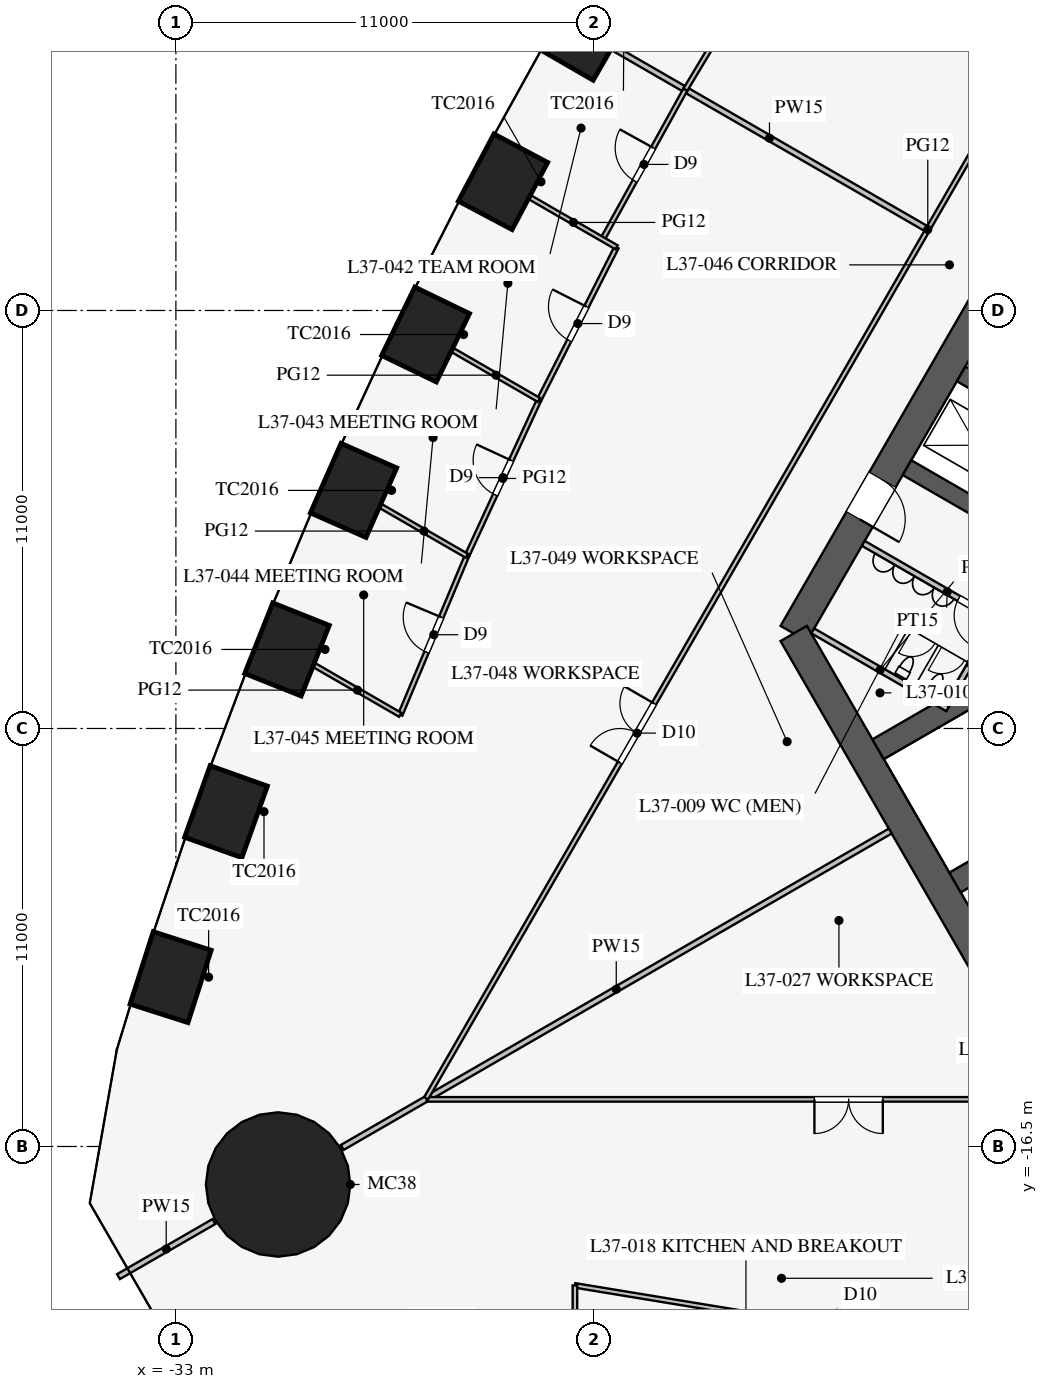
"""IFC4 building model, lengths in metres.
Left out: names, types, materials, properties, quantities, classifications, styles, units other than length and angle.
Written with IfcOpenShell. Run it as: python <this file> out.ifc"""

import sys

from ifc_helpers import new_model, si_unit, direction, frame, frame_2d, origin, origin_2d, place, context, subcontext, project, spatial, rectangle, circle, extrude, element, fill, save


model = new_model("IFC4")
c1 = context("Model", 3, precision=1e-05, world=origin(), true_north=direction((0.0, 1.0)))
c2 = subcontext(c1, "Body", "Model", "MODEL_VIEW")
j1 = project(units=[si_unit("LENGTHUNIT", "METRE"), si_unit("PLANEANGLEUNIT", "RADIAN")], contexts=[c1])
p1 = place(None, origin())
s1 = spatial("IfcSite", under=j1, at=p1, CompositionType="ELEMENT")
p2 = place(p1, origin())
s2 = spatial("IfcBuilding", under=s1, at=p2, CompositionType="ELEMENT")
p3 = place(p2, frame((0.0, 0.0, 161.9)))
s3 = spatial("IfcBuildingStorey", under=s2, at=p3, CompositionType="ELEMENT", Elevation=161.9)
for number, where, z_axis, x_axis in (
    (1, (-22.213, 12.825, 0.0), (0.0, 0.0, 1.0), (-0.5, -0.866, 0.0)),
    (2, (-24.393, 8.887, 0.0), (0.0, 0.0, 1.0), (-0.468, -0.883, 0.0)),
    (3, (-26.43, 4.867, 0.0), (0.0, 0.0, 1.0), (-0.436, -0.9, 0.0)),
    (4, (-28.325, 0.765, 0.0), (0.0, 0.0, 1.0), (-0.403, -0.915, 0.0)),
    (5, (-30.077, -3.42, 0.0), (0.0, 0.0, 1.0), (-0.37, -0.929, 0.0)),
    (6, (-31.682, -7.689, 0.0), (0.0, 0.0, 1.0), (-0.336, -0.942, 0.0)),
    (7, (-33.139, -12.044, 0.0), (0.0, 0.0, 1.0), (-0.305, -0.952, 0.0)),
):
    element("IfcColumn", number, at=place(p3, frame(where, z_axis=z_axis, x_axis=x_axis)), inside=s3, PredefinedType="COLUMN", context=c2, shape_type="SweptSolid", body=[
        extrude(rectangle(XDim=2.0, YDim=1.6, at=origin_2d()), origin(), (0.0, 0.0, 1.0), 4.2),
    ])
p4 = place(p3, frame((-30.311, -17.5, 0.0), z_axis=(0.0, 0.0, 1.0), x_axis=(1.0, 0.0, 0.0)))
e8 = element("IfcColumn", 8, at=p4, inside=s3, PredefinedType="COLUMN", context=c2, shape_type="SweptSolid", body=[
    extrude(circle(Radius=1.9, at=origin_2d()), origin(), (0.0, 0.0, 1.0), 4.2),
])
p5 = place(p3, frame((-5.773, 16.0, 0.0), z_axis=(0.0, 0.0, 1.0), x_axis=(-0.500002442456, -0.866023993627, 0.0)))
e9 = element("IfcWall", 9, at=p5, inside=s3, PredefinedType="SHEAR", context=c2, shape_type="SweptSolid", body=[
    extrude(rectangle(XDim=21.939, YDim=0.8, at=frame_2d((10.97, 0.0))), origin(), (0.0, 0.0, 1.0), 4.2),
])
p6 = place(p5, frame((17.27, 0.0, 0.0)))
e10 = element("IfcOpeningElement", 10, at=p6, cuts=e9, PredefinedType="OPENING", context=c2, shape_type="SweptSolid", body=[
    extrude(rectangle(XDim=1.2, YDim=2.1, at=frame_2d((0.6, 1.05))), frame((0.0, 0.41, 0.0), z_axis=(0.0, -1.0, 0.0), x_axis=(1.0, 0.0, 0.0)), (0.0, 0.0, 1.0), 0.82),
])
p7 = place(p5, frame((3.47, 0.0, 0.0)))
e11 = element("IfcOpeningElement", 11, at=p7, cuts=e9, PredefinedType="OPENING", context=c2, shape_type="SweptSolid", body=[
    extrude(rectangle(XDim=1.2, YDim=2.1, at=frame_2d((0.6, 1.05))), frame((0.0, 0.41, 0.0), z_axis=(0.0, -1.0, 0.0), x_axis=(1.0, 0.0, 0.0)), (0.0, 0.0, 1.0), 0.82),
])
p8 = place(p3, frame((-16.743, -3.0, 0.0), z_axis=(0.0, 0.0, 1.0), x_axis=(0.499995765644, -0.866027848477, 0.0)))
e12 = element("IfcWall", 12, at=p8, inside=s3, PredefinedType="SHEAR", context=c2, shape_type="SweptSolid", body=[
    extrude(rectangle(XDim=11.547, YDim=0.8, at=frame_2d((5.773, 0.0))), origin(), (0.0, 0.0, 1.0), 4.2),
])
for number, where, z_axis, x_axis in (
    (13, (-10.107, 2.544, 0.0), (0.0, 0.0, 1.0), (-0.866, 0.5, 0.0)),
    (14, (-11.532, 0.076, 0.0), (0.0, 0.0, 1.0), (-0.866, 0.5, 0.0)),
):
    element("IfcWall", number, at=place(p3, frame(where, z_axis=z_axis, x_axis=x_axis)), inside=s3, PredefinedType="SHEAR", context=c2, shape_type="SweptSolid", body=[
        extrude(rectangle(XDim=2.575, YDim=0.45, at=frame_2d((1.288, 0.0))), origin(), (0.0, 0.0, 1.0), 4.2),
    ])
for number, where, z_axis, x_axis in (
    (15, (-6.663, -1.509, 0.0), (0.0, 0.0, 1.0), (-0.866, -0.5, 0.0)),
    (16, (-4.638, -5.016, 0.0), (0.0, 0.0, 1.0), (-0.866, -0.5, 0.0)),
):
    element("IfcWall", number, at=place(p3, frame(where, z_axis=z_axis, x_axis=x_axis)), inside=s3, PredefinedType="SHEAR", context=c2, shape_type="SweptSolid", body=[
        extrude(rectangle(XDim=9.075, YDim=0.6, at=frame_2d((4.538, 0.0))), origin(), (0.0, 0.0, 1.0), 4.2),
    ])
p9 = place(p3, frame((-10.495, -3.178, 0.0), z_axis=(0.0, 0.0, 1.0), x_axis=(-0.86602216432, 0.500005610874, 0.0)))
e17 = element("IfcWall", 17, at=p9, inside=s3, PredefinedType="PARTITIONING", context=c2, shape_type="SweptSolid", body=[
    extrude(rectangle(XDim=5.1, YDim=0.15, at=frame_2d((2.55, 0.0))), origin(), (0.0, 0.0, 1.0), 4.0),
])
p10 = place(p9, frame((1.3, 0.0, 0.0)))
e18 = element("IfcOpeningElement", 18, at=p10, cuts=e17, PredefinedType="OPENING", context=c2, shape_type="SweptSolid", body=[
    extrude(rectangle(XDim=0.9, YDim=2.1, at=frame_2d((0.45, 1.05))), frame((0.0, 0.085, 0.0), z_axis=(0.0, -1.0, 0.0), x_axis=(1.0, 0.0, 0.0)), (0.0, 0.0, 1.0), 0.17),
])
p11 = place(p3, frame((-12.691, -4.982, 0.0), z_axis=(0.0, 0.0, 1.0), x_axis=(-0.8660249478, 0.500000789788, 0.0)))
e19 = element("IfcWall", 19, at=p11, inside=s3, PredefinedType="PARTITIONING", context=c2, shape_type="SweptSolid", body=[
    extrude(rectangle(XDim=4.1, YDim=0.15, at=frame_2d((2.05, 0.0))), origin(), (0.0, 0.0, 1.0), 4.0),
])
p12 = place(p3, frame((-11.464, -2.706, 0.0), z_axis=(0.0, 0.0, 1.0), x_axis=(-0.50001992892, -0.866013897511, 0.0)))
e20 = element("IfcWall", 20, at=p12, inside=s3, PredefinedType="PARTITIONING", context=c2, shape_type="SweptSolid", body=[
    extrude(rectangle(XDim=2.51, YDim=0.15, at=frame_2d((1.255, 0.0))), origin(), (0.0, 0.0, 1.0), 4.0),
])
p13 = place(p3, frame((-14.203, -8.2, 0.0), z_axis=(0.0, 0.0, 1.0), x_axis=(-0.866024668836, -0.500001272966, 0.0)))
e21 = element("IfcWall", 21, at=p13, inside=s3, PredefinedType="PARTITIONING", context=c2, shape_type="SweptSolid", body=[
    extrude(rectangle(XDim=16.65, YDim=0.15, at=frame_2d((8.325, 0.0))), origin(), (0.0, 0.0, 1.0), 2.3),
])
p14 = place(p3, frame((-32.0, -18.475, 0.0), z_axis=(0.0, 0.0, 1.0), x_axis=(-0.866042548026, -0.499970304126, 0.0)))
e22 = element("IfcWall", 22, at=p14, inside=s3, PredefinedType="PARTITIONING", context=c2, shape_type="SweptSolid", body=[
    extrude(rectangle(XDim=2.899, YDim=0.15, at=frame_2d((1.45, 0.0))), origin(), (0.0, 0.0, 1.0), 2.3),
])
p15 = place(p3, frame((-26.398, -15.26, 0.0), z_axis=(0.0, 0.0, 1.0), x_axis=(1.0, 0.0, 0.0)))
e23 = element("IfcWall", 23, at=p15, inside=s3, PredefinedType="PARTITIONING", context=c2, shape_type="SweptSolid", body=[
    extrude(rectangle(XDim=52.796, YDim=0.12, at=frame_2d((26.398, 0.0))), origin(), (0.0, 0.0, 1.0), 2.9),
])
p16 = place(p15, frame((10.2, 0.0, 0.15)))
e24 = element("IfcOpeningElement", 24, at=p16, cuts=e23, PredefinedType="OPENING", context=c2, shape_type="SweptSolid", body=[
    extrude(rectangle(XDim=1.8, YDim=2.1, at=frame_2d((0.9, 1.05))), frame((0.0, 0.07, 0.0), z_axis=(0.0, -1.0, 0.0), x_axis=(1.0, 0.0, 0.0)), (0.0, 0.0, 1.0), 0.14),
])
p17 = place(p15, frame((40.8, 0.0, 0.15)))
e25 = element("IfcOpeningElement", 25, at=p17, cuts=e23, PredefinedType="OPENING", context=c2, shape_type="SweptSolid", body=[
    extrude(rectangle(XDim=1.8, YDim=2.1, at=frame_2d((0.9, 1.05))), frame((0.0, 0.07, 0.0), z_axis=(0.0, -1.0, 0.0), x_axis=(1.0, 0.0, 0.0)), (0.0, 0.0, 1.0), 0.14),
])
p18 = place(p3, frame((-22.5, -20.156, 0.0), z_axis=(0.0, 0.0, 1.0), x_axis=(0.986764681833, -0.162158757664, 0.0)))
e26 = element("IfcWall", 26, at=p18, inside=s3, PredefinedType="PARTITIONING", context=c2, shape_type="SweptSolid", body=[
    extrude(rectangle(XDim=4.56, YDim=0.12, at=frame_2d((2.28, 0.0))), origin(), (0.0, 0.0, 1.0), 2.9),
])
p19 = place(p3, frame((-22.5, -20.156, 0.0), z_axis=(0.0, 0.0, 1.0), x_axis=(0.0, -1.0, 0.0)))
e27 = element("IfcWall", 27, at=p19, inside=s3, PredefinedType="PARTITIONING", context=c2, shape_type="SweptSolid", body=[
    extrude(rectangle(XDim=2.593, YDim=0.12, at=frame_2d((1.296, 0.0))), origin(), (0.0, 0.0, 1.0), 2.9),
])
p20 = place(p3, frame((-13.268, 7.66, 0.0), z_axis=(0.0, 0.0, 1.0), x_axis=(-0.866013963754, 0.500019814191, 0.0)))
e28 = element("IfcWall", 28, at=p20, inside=s3, PredefinedType="PARTITIONING", context=c2, shape_type="SweptSolid", body=[
    extrude(rectangle(XDim=9.5, YDim=0.15, at=frame_2d((4.75, 0.0))), origin(), (0.0, 0.0, 1.0), 2.8),
])
p21 = place(p3, frame((-0.016, 30.491, 0.0), z_axis=(0.0, 0.0, 1.0), x_axis=(-0.50000091641, -0.866024874695, 0.0)))
e29 = element("IfcWall", 29, at=p21, inside=s3, PredefinedType="PARTITIONING", context=c2, shape_type="SweptSolid", body=[
    extrude(rectangle(XDim=52.796, YDim=0.12, at=frame_2d((26.398, 0.0))), origin(), (0.0, 0.0, 1.0), 2.9),
])
p22 = place(p21, frame((10.2, 0.0, 0.15)))
e30 = element("IfcOpeningElement", 30, at=p22, cuts=e29, PredefinedType="OPENING", context=c2, shape_type="SweptSolid", body=[
    extrude(rectangle(XDim=1.8, YDim=2.1, at=frame_2d((0.9, 1.05))), frame((0.0, 0.07, 0.0), z_axis=(0.0, -1.0, 0.0), x_axis=(1.0, 0.0, 0.0)), (0.0, 0.0, 1.0), 0.14),
])
p23 = place(p21, frame((40.8, 0.0, 0.15)))
e31 = element("IfcOpeningElement", 31, at=p23, cuts=e29, PredefinedType="OPENING", context=c2, shape_type="SweptSolid", body=[
    extrude(rectangle(XDim=1.8, YDim=2.1, at=frame_2d((0.9, 1.05))), frame((0.0, 0.07, 0.0), z_axis=(0.0, -1.0, 0.0), x_axis=(1.0, 0.0, 0.0)), (0.0, 0.0, 1.0), 0.14),
])
p24 = place(p3, frame((-19.594, 11.312, 0.0), z_axis=(0.0, 0.0, 1.0), x_axis=(-0.484315883017, -0.87489320803, 0.0)))
e32 = element("IfcWall", 32, at=p24, inside=s3, PredefinedType="PARTITIONING", context=c2, shape_type="SweptSolid", body=[
    extrude(rectangle(XDim=4.5, YDim=0.12, at=frame_2d((2.25, 0.0))), origin(), (0.0, 0.0, 1.0), 2.9),
])
p25 = place(p24, frame((1.75, 0.0, 0.15)))
e33 = element("IfcOpeningElement", 33, at=p25, cuts=e32, PredefinedType="OPENING", context=c2, shape_type="SweptSolid", body=[
    extrude(rectangle(XDim=1.0, YDim=2.1, at=frame_2d((0.5, 1.05))), frame((0.0, 0.07, 0.0), z_axis=(0.0, -1.0, 0.0), x_axis=(1.0, 0.0, 0.0)), (0.0, 0.0, 1.0), 0.14),
])
p26 = place(p3, frame((-25.342, -0.958, 0.0), z_axis=(0.0, 0.0, 1.0), x_axis=(-0.386807881778, -0.922160323693, 0.0)))
e34 = element("IfcWall", 34, at=p26, inside=s3, PredefinedType="PARTITIONING", context=c2, shape_type="SweptSolid", body=[
    extrude(rectangle(XDim=4.536, YDim=0.12, at=frame_2d((2.268, 0.0))), origin(), (0.0, 0.0, 1.0), 2.9),
])
p27 = place(p26, frame((1.75, 0.0, 0.15)))
e35 = element("IfcOpeningElement", 35, at=p27, cuts=e34, PredefinedType="OPENING", context=c2, shape_type="SweptSolid", body=[
    extrude(rectangle(XDim=1.0, YDim=2.1, at=frame_2d((0.5, 1.05))), frame((0.0, 0.07, 0.0), z_axis=(0.0, -1.0, 0.0), x_axis=(1.0, 0.0, 0.0)), (0.0, 0.0, 1.0), 0.14),
])
p28 = place(p3, frame((-21.405, 7.162, 0.0), z_axis=(0.0, 0.0, 1.0), x_axis=(-0.452471679136, -0.891778772779, 0.0)))
e36 = element("IfcWall", 36, at=p28, inside=s3, PredefinedType="PARTITIONING", context=c2, shape_type="SweptSolid", body=[
    extrude(rectangle(XDim=4.507, YDim=0.12, at=frame_2d((2.253, 0.0))), origin(), (0.0, 0.0, 1.0), 2.9),
])
p29 = place(p28, frame((1.75, 0.0, 0.15)))
e37 = element("IfcOpeningElement", 37, at=p29, cuts=e36, PredefinedType="OPENING", context=c2, shape_type="SweptSolid", body=[
    extrude(rectangle(XDim=1.0, YDim=2.1, at=frame_2d((0.5, 1.05))), frame((0.0, 0.07, 0.0), z_axis=(0.0, -1.0, 0.0), x_axis=(1.0, 0.0, 0.0)), (0.0, 0.0, 1.0), 0.14),
])
p30 = place(p3, frame((-23.444, 3.143, 0.0), z_axis=(0.0, 0.0, 1.0), x_axis=(-0.419883773418, -0.907577884713, 0.0)))
e38 = element("IfcWall", 38, at=p30, inside=s3, PredefinedType="PARTITIONING", context=c2, shape_type="SweptSolid", body=[
    extrude(rectangle(XDim=4.519, YDim=0.12, at=frame_2d((2.259, 0.0))), origin(), (0.0, 0.0, 1.0), 2.9),
])
p31 = place(p30, frame((1.75, 0.0, 0.15)))
e39 = element("IfcOpeningElement", 39, at=p31, cuts=e38, PredefinedType="OPENING", context=c2, shape_type="SweptSolid", body=[
    extrude(rectangle(XDim=1.0, YDim=2.1, at=frame_2d((0.5, 1.05))), frame((0.0, 0.07, 0.0), z_axis=(0.0, -1.0, 0.0), x_axis=(1.0, 0.0, 0.0)), (0.0, 0.0, 1.0), 0.14),
])
p32 = place(p3, frame((-17.273, 15.169, 0.0), z_axis=(0.0, 0.0, 1.0), x_axis=(-0.515524404457, -0.856874896592, 0.0)))
e40 = element("IfcWall", 40, at=p32, inside=s3, PredefinedType="PARTITIONING", context=c2, shape_type="SweptSolid", body=[
    extrude(rectangle(XDim=4.501, YDim=0.12, at=frame_2d((2.25, 0.0))), origin(), (0.0, 0.0, 1.0), 2.9),
])
p33 = place(p32, frame((1.75, 0.0, 0.15)))
e41 = element("IfcOpeningElement", 41, at=p33, cuts=e40, PredefinedType="OPENING", context=c2, shape_type="SweptSolid", body=[
    extrude(rectangle(XDim=1.0, YDim=2.1, at=frame_2d((0.5, 1.05))), frame((0.0, 0.07, 0.0), z_axis=(0.0, -1.0, 0.0), x_axis=(1.0, 0.0, 0.0)), (0.0, 0.0, 1.0), 0.14),
])
p34 = place(p3, frame((-25.342, -0.958, 0.0), z_axis=(0.0, 0.0, 1.0), x_axis=(-0.866036074319, 0.499981517636, 0.0)))
e42 = element("IfcWall", 42, at=p34, inside=s3, PredefinedType="PARTITIONING", context=c2, shape_type="SweptSolid", body=[
    extrude(rectangle(XDim=2.61, YDim=0.12, at=frame_2d((1.305, 0.0))), origin(), (0.0, 0.0, 1.0), 2.6),
])
p35 = place(p3, frame((-27.096, -5.141, 0.0), z_axis=(0.0, 0.0, 1.0), x_axis=(-0.866012205188, 0.500022859943, 0.0)))
e43 = element("IfcWall", 43, at=p35, inside=s3, PredefinedType="PARTITIONING", context=c2, shape_type="SweptSolid", body=[
    extrude(rectangle(XDim=2.603, YDim=0.12, at=frame_2d((1.302, 0.0))), origin(), (0.0, 0.0, 1.0), 2.8),
])
p36 = place(p3, frame((-21.405, 7.162, 0.0), z_axis=(0.0, 0.0, 1.0), x_axis=(-0.866008611403, 0.50002908413, 0.0)))
e44 = element("IfcWall", 44, at=p36, inside=s3, PredefinedType="PARTITIONING", context=c2, shape_type="SweptSolid", body=[
    extrude(rectangle(XDim=2.619, YDim=0.12, at=frame_2d((1.31, 0.0))), origin(), (0.0, 0.0, 1.0), 2.8),
])
p37 = place(p3, frame((-23.444, 3.143, 0.0), z_axis=(0.0, 0.0, 1.0), x_axis=(-0.866011491631, 0.500024095782, 0.0)))
e45 = element("IfcWall", 45, at=p37, inside=s3, PredefinedType="PARTITIONING", context=c2, shape_type="SweptSolid", body=[
    extrude(rectangle(XDim=2.615, YDim=0.12, at=frame_2d((1.308, 0.0))), origin(), (0.0, 0.0, 1.0), 2.9),
])
p38 = place(p10, origin())
e46 = element("IfcDoor", 46, at=p38, inside=s3, OperationType="SINGLE_SWING_LEFT", PredefinedType="DOOR", context=c2, shape_type="SweptSolid", body=[
    extrude(rectangle(XDim=0.9, YDim=2.1, at=frame_2d((0.45, 1.05))), frame((0.0, 0.025, 0.0), z_axis=(0.0, -1.0, 0.0), x_axis=(1.0, 0.0, 0.0)), (0.0, 0.0, 1.0), 0.05),
])
fill(e18, e46)
p39 = place(p6, origin())
e47 = element("IfcDoor", 47, at=p39, inside=s3, OperationType="SINGLE_SWING_RIGHT", PredefinedType="DOOR", context=c2, shape_type="SweptSolid", body=[
    extrude(rectangle(XDim=1.2, YDim=2.1, at=frame_2d((0.6, 1.05))), frame((0.0, 0.025, 0.0), z_axis=(0.0, -1.0, 0.0), x_axis=(1.0, 0.0, 0.0)), (0.0, 0.0, 1.0), 0.05),
])
fill(e10, e47)
p40 = place(p16, frame((1.8, 0.0, 0.0), z_axis=(0.0, 0.0, 1.0), x_axis=(-1.0, 0.0, 0.0)))
e48 = element("IfcDoor", 48, at=p40, inside=s3, OperationType="DOUBLE_DOOR_SINGLE_SWING", PredefinedType="DOOR", context=c2, shape_type="SweptSolid", body=[
    extrude(rectangle(XDim=1.8, YDim=2.1, at=frame_2d((0.9, 1.05))), frame((0.0, 0.025, 0.0), z_axis=(0.0, -1.0, 0.0), x_axis=(1.0, 0.0, 0.0)), (0.0, 0.0, 1.0), 0.05),
])
fill(e24, e48)
p41 = place(p25, frame((1.0, 0.0, 0.0), z_axis=(0.0, 0.0, 1.0), x_axis=(-1.0, 0.0, 0.0)))
e49 = element("IfcDoor", 49, at=p41, inside=s3, OperationType="SINGLE_SWING_RIGHT", PredefinedType="DOOR", context=c2, shape_type="SweptSolid", body=[
    extrude(rectangle(XDim=1.0, YDim=2.1, at=frame_2d((0.5, 1.05))), frame((0.0, 0.025, 0.0), z_axis=(0.0, -1.0, 0.0), x_axis=(1.0, 0.0, 0.0)), (0.0, 0.0, 1.0), 0.05),
])
fill(e33, e49)
p42 = place(p29, frame((1.0, 0.0, 0.0), z_axis=(0.0, 0.0, 1.0), x_axis=(-1.0, 0.0, 0.0)))
e50 = element("IfcDoor", 50, at=p42, inside=s3, OperationType="SINGLE_SWING_RIGHT", PredefinedType="DOOR", context=c2, shape_type="SweptSolid", body=[
    extrude(rectangle(XDim=1.0, YDim=2.1, at=frame_2d((0.5, 1.05))), frame((0.0, 0.025, 0.0), z_axis=(0.0, -1.0, 0.0), x_axis=(1.0, 0.0, 0.0)), (0.0, 0.0, 1.0), 0.05),
])
fill(e37, e50)
p43 = place(p31, frame((1.0, 0.0, 0.0), z_axis=(0.0, 0.0, 1.0), x_axis=(-1.0, 0.0, 0.0)))
e51 = element("IfcDoor", 51, at=p43, inside=s3, OperationType="SINGLE_SWING_RIGHT", PredefinedType="DOOR", context=c2, shape_type="SweptSolid", body=[
    extrude(rectangle(XDim=1.0, YDim=2.1, at=frame_2d((0.5, 1.05))), frame((0.0, 0.025, 0.0), z_axis=(0.0, -1.0, 0.0), x_axis=(1.0, 0.0, 0.0)), (0.0, 0.0, 1.0), 0.05),
])
fill(e39, e51)
p44 = place(p27, frame((1.0, 0.0, 0.0), z_axis=(0.0, 0.0, 1.0), x_axis=(-1.0, 0.0, 0.0)))
e52 = element("IfcDoor", 52, at=p44, inside=s3, OperationType="SINGLE_SWING_RIGHT", PredefinedType="DOOR", context=c2, shape_type="SweptSolid", body=[
    extrude(rectangle(XDim=1.0, YDim=2.1, at=frame_2d((0.5, 1.05))), frame((0.0, 0.025, 0.0), z_axis=(0.0, -1.0, 0.0), x_axis=(1.0, 0.0, 0.0)), (0.0, 0.0, 1.0), 0.05),
])
fill(e35, e52)
p45 = place(p23, frame((1.8, 0.0, 0.0), z_axis=(0.0, 0.0, 1.0), x_axis=(-1.0, 0.0, 0.0)))
e53 = element("IfcDoor", 53, at=p45, inside=s3, OperationType="DOUBLE_DOOR_SINGLE_SWING", PredefinedType="DOOR", context=c2, shape_type="SweptSolid", body=[
    extrude(rectangle(XDim=1.8, YDim=2.1, at=frame_2d((0.9, 1.05))), frame((0.0, 0.025, 0.0), z_axis=(0.0, -1.0, 0.0), x_axis=(1.0, 0.0, 0.0)), (0.0, 0.0, 1.0), 0.05),
])
fill(e31, e53)
save(model, sys.argv[1])
